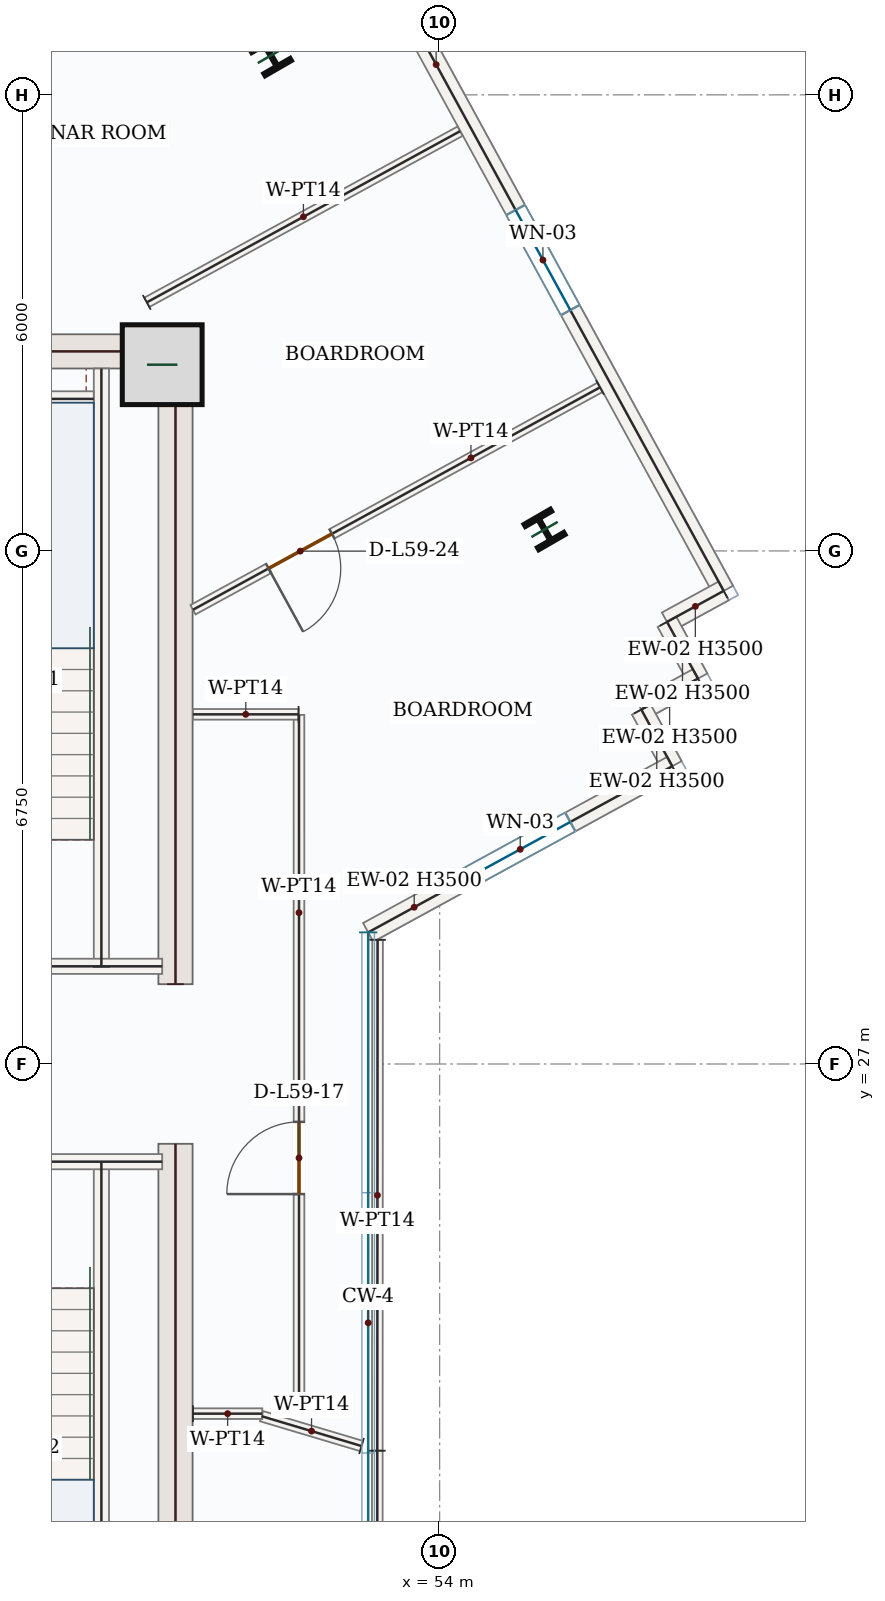
"""IFC4 building model, lengths in metres.
Left out: names, types, materials, properties, quantities, classifications, styles, units other than length and angle.
Written with IfcOpenShell. Run it as: python <this file> out.ifc"""

import sys

from ifc_helpers import new_model, si_unit, direction, frame, frame_2d, origin, origin_2d, place, context, subcontext, project, spatial, rectangle, i_section, extrude, source, transform, mapped, element, fill, save


model = new_model("IFC4")
c1 = context("Model", 3, precision=1e-05, world=origin(), true_north=direction((0.0, 1.0)))
c2 = subcontext(c1, "Body", "Model", "MODEL_VIEW")
j1 = project(units=[si_unit("LENGTHUNIT", "METRE"), si_unit("PLANEANGLEUNIT", "RADIAN")], contexts=[c1])
p1 = place(None, origin())
s1 = spatial("IfcSite", under=j1, at=p1, CompositionType="ELEMENT")
p2 = place(p1, origin())
s2 = spatial("IfcBuilding", under=s1, at=p2, CompositionType="ELEMENT")
p3 = place(p2, frame((0.0, 0.0, 250.35)))
s3 = spatial("IfcBuildingStorey", under=s2, at=p3, CompositionType="ELEMENT", Elevation=250.35)
m1 = source(origin(), c2, "Body", "SweptSolid", [
    extrude(rectangle(XDim=8.55, YDim=0.45, at=frame_2d((4.275, 0.0))), origin(), (0.0, 0.0, 1.0), 3.5),
])
for number, where, z_axis, x_axis in (
    (1, (50.525, 17.4, 0.0), (0.0, 0.0, 1.0), (0.0, 1.0, 0.0)),
    (2, (50.525, 28.05, 0.0), (0.0, 0.0, 1.0), (0.0, 1.0, 0.0)),
):
    element("IfcWall", number, at=place(p3, frame(where, z_axis=z_axis, x_axis=x_axis)), inside=s3, PredefinedType="SHEAR", context=c2, shape_type="MappedRepresentation", body=[
        mapped(m1, transform((0.0, 0.0, 0.0), x_axis=(1.0, 0.0, 0.0), y_axis=(0.0, 1.0, 0.0), z_axis=(0.0, 0.0, 1.0), scale=1.0)),
    ])
m2 = source(origin(), c2, "Body", "SweptSolid", [
    extrude(rectangle(XDim=7.1, YDim=0.45, at=frame_2d((3.55, 0.0))), origin(), (0.0, 0.0, 1.0), 3.5),
])
p4 = place(p3, frame((43.2, 36.375, 0.0), z_axis=(0.0, 0.0, 1.0), x_axis=(1.0, 0.0, 0.0)))
e3 = element("IfcWall", 3, at=p4, inside=s3, PredefinedType="SHEAR", context=c2, shape_type="MappedRepresentation", body=[
    mapped(m2, transform((0.0, 0.0, 0.0), x_axis=(1.0, 0.0, 0.0), y_axis=(0.0, 1.0, 0.0), z_axis=(0.0, 0.0, 1.0), scale=1.0)),
])
m3 = source(origin(), c2, "Body", "SweptSolid", [
    extrude(rectangle(XDim=1.05, YDim=1.05, at=origin_2d()), origin(), (0.0, 0.0, 1.0), 3.75),
])
p5 = place(p3, frame((50.35, 36.2, 0.0), z_axis=(0.0, 0.0, 1.0), x_axis=(1.0, 0.0, 0.0)))
e4 = element("IfcColumn", 4, at=p5, inside=s3, PredefinedType="COLUMN", context=c2, shape_type="MappedRepresentation", body=[
    mapped(m3, transform((0.0, 0.0, 0.0), x_axis=(1.0, 0.0, 0.0), y_axis=(0.0, 1.0, 0.0), z_axis=(0.0, 0.0, 1.0), scale=1.0)),
])
m4 = source(origin(), c2, "Body", "SweptSolid", [
    extrude(i_section(OverallWidth=0.399, OverallDepth=0.386, WebThickness=0.021, FlangeThickness=0.033, FilletRadius=0.018, at=origin_2d()), origin(), (0.0, 0.0, 1.0), 3.75),
])
for number, where, z_axis, x_axis in (
    (5, (55.38, 34.032, 0.0), (0.0, 0.0, 1.0), (0.866, 0.5, 0.0)),
    (6, (51.78, 40.268, 0.0), (0.0, 0.0, 1.0), (0.866, 0.5, 0.0)),
):
    element("IfcColumn", number, at=place(p3, frame(where, z_axis=z_axis, x_axis=x_axis)), inside=s3, PredefinedType="COLUMN", context=c2, shape_type="MappedRepresentation", body=[
        mapped(m4, transform((0.0, 0.0, 0.0), x_axis=(1.0, 0.0, 0.0), y_axis=(0.0, 1.0, 0.0), z_axis=(0.0, 0.0, 1.0), scale=1.0)),
    ])
p6 = place(p3, frame((44.549, 39.26, 0.0), z_axis=(0.0, 0.0, 1.0), x_axis=(0.877569176667, 0.479450039279, 0.0)))
e7 = element("IfcWall", 7, at=p6, inside=s3, PredefinedType="SOLIDWALL", context=c2, shape_type="SweptSolid", body=[
    extrude(rectangle(XDim=6.979, YDim=0.28, at=frame_2d((3.49, 0.0))), origin(), (0.0, 0.0, 1.0), 3.5),
])
p7 = place(p6, frame((2.74, 0.0, 0.85)))
e8 = element("IfcOpeningElement", 8, at=p7, cuts=e7, PredefinedType="OPENING", context=c2, shape_type="SweptSolid", body=[
    extrude(rectangle(XDim=1.5, YDim=1.5, at=frame_2d((0.75, 0.75))), frame((0.0, 0.15, 0.0), z_axis=(0.0, -1.0, 0.0), x_axis=(1.0, 0.0, 0.0)), (0.0, 0.0, 1.0), 0.3),
])
p8 = place(p3, frame((52.981, 41.929, 0.0), z_axis=(0.0, 0.0, 1.0), x_axis=(0.479472774144, -0.877556755347, 0.0)))
e9 = element("IfcWall", 9, at=p8, inside=s3, PredefinedType="SOLIDWALL", context=c2, shape_type="SweptSolid", body=[
    extrude(rectangle(XDim=9.92, YDim=0.28, at=frame_2d((4.96, 0.0))), origin(), (0.0, 0.0, 1.0), 3.5),
])
p9 = place(p8, frame((4.21, 0.0, 0.85)))
e10 = element("IfcOpeningElement", 10, at=p9, cuts=e9, PredefinedType="OPENING", context=c2, shape_type="SweptSolid", body=[
    extrude(rectangle(XDim=1.5, YDim=1.5, at=frame_2d((0.75, 0.75))), frame((0.0, 0.15, 0.0), z_axis=(0.0, -1.0, 0.0), x_axis=(1.0, 0.0, 0.0)), (0.0, 0.0, 1.0), 0.3),
])
m5 = source(origin(), c2, "Body", "SweptSolid", [
    extrude(rectangle(XDim=0.85, YDim=0.28, at=frame_2d((0.425, 0.0))), origin(), (0.0, 0.0, 1.0), 3.5),
])
p10 = place(p3, frame((57.737, 33.224, 0.0), z_axis=(0.0, 0.0, 1.0), x_axis=(-0.87752219781, -0.479536017782, 0.0)))
e11 = element("IfcWall", 11, at=p10, inside=s3, PredefinedType="SOLIDWALL", context=c2, shape_type="MappedRepresentation", body=[
    mapped(m5, transform((0.0, 0.0, 0.0), x_axis=(1.0, 0.0, 0.0), y_axis=(0.0, 1.0, 0.0), z_axis=(0.0, 0.0, 1.0), scale=1.0)),
])
m6 = source(origin(), c2, "Body", "SweptSolid", [
    extrude(rectangle(XDim=0.85, YDim=0.28, at=frame_2d((0.425, 0.0))), origin(), (0.0, 0.0, 1.0), 3.5),
])
for number, where, z_axis, x_axis in (
    (12, (56.991, 32.816, 0.0), (0.0, 0.0, 1.0), (0.479, -0.878, 0.0)),
    (13, (57.399, 32.071, 0.0), (0.0, 0.0, 1.0), (-0.878, -0.479, 0.0)),
):
    element("IfcWall", number, at=place(p3, frame(where, z_axis=z_axis, x_axis=x_axis)), inside=s3, PredefinedType="SOLIDWALL", context=c2, shape_type="MappedRepresentation", body=[
        mapped(m6, transform((0.0, 0.0, 0.0), x_axis=(1.0, 0.0, 0.0), y_axis=(0.0, 1.0, 0.0), z_axis=(0.0, 0.0, 1.0), scale=1.0)),
    ])
m7 = source(origin(), c2, "Body", "SweptSolid", [
    extrude(rectangle(XDim=0.85, YDim=0.28, at=frame_2d((0.425, 0.0))), origin(), (0.0, 0.0, 1.0), 3.5),
])
p11 = place(p3, frame((56.653, 31.663, 0.0), z_axis=(0.0, 0.0, 1.0), x_axis=(0.479314855696, -0.877643019177, 0.0)))
e14 = element("IfcWall", 14, at=p11, inside=s3, PredefinedType="SOLIDWALL", context=c2, shape_type="MappedRepresentation", body=[
    mapped(m7, transform((0.0, 0.0, 0.0), x_axis=(1.0, 0.0, 0.0), y_axis=(0.0, 1.0, 0.0), z_axis=(0.0, 0.0, 1.0), scale=1.0)),
])
p12 = place(p3, frame((57.06, 30.917, 0.0), z_axis=(0.0, 0.0, 1.0), x_axis=(-0.877563774399, -0.479459927276, 0.0)))
e15 = element("IfcWall", 15, at=p12, inside=s3, PredefinedType="SOLIDWALL", context=c2, shape_type="SweptSolid", body=[
    extrude(rectangle(XDim=4.558, YDim=0.28, at=frame_2d((2.279, 0.0))), origin(), (0.0, 0.0, 1.0), 3.5),
])
p13 = place(p12, frame((1.529, 0.0, 0.85)))
e16 = element("IfcOpeningElement", 16, at=p13, cuts=e15, PredefinedType="OPENING", context=c2, shape_type="SweptSolid", body=[
    extrude(rectangle(XDim=1.5, YDim=1.5, at=frame_2d((0.75, 0.75))), frame((0.0, 0.15, 0.0), z_axis=(0.0, -1.0, 0.0), x_axis=(1.0, 0.0, 0.0)), (0.0, 0.0, 1.0), 0.3),
])
m8 = source(origin(), c2, "Body", "SweptSolid", [
    extrude(rectangle(XDim=7.87, YDim=0.2, at=frame_2d((3.935, 0.0))), origin(), (0.0, 0.0, 1.0), 3.5),
])
for number, where, z_axis, x_axis in (
    (17, (49.55, 17.85, 0.0), (0.0, 0.0, 1.0), (0.0, 1.0, 0.0)),
    (18, (49.55, 28.28, 0.0), (0.0, 0.0, 1.0), (0.0, 1.0, 0.0)),
):
    element("IfcWall", number, at=place(p3, frame(where, z_axis=z_axis, x_axis=x_axis)), inside=s3, PredefinedType="SOLIDWALL", context=c2, shape_type="MappedRepresentation", body=[
        mapped(m8, transform((0.0, 0.0, 0.0), x_axis=(1.0, 0.0, 0.0), y_axis=(0.0, 1.0, 0.0), z_axis=(0.0, 0.0, 1.0), scale=1.0)),
    ])
m9 = source(origin(), c2, "Body", "SweptSolid", [
    extrude(rectangle(XDim=4.25, YDim=0.2, at=frame_2d((2.125, 0.0))), origin(), (0.0, 0.0, 1.0), 3.5),
])
for number, where, z_axis, x_axis in (
    (19, (46.1, 25.715, 0.0), (0.0, 0.0, 1.0), (1.0, 0.0, 0.0)),
    (20, (46.1, 28.285, 0.0), (0.0, 0.0, 1.0), (1.0, 0.0, 0.0)),
):
    element("IfcWall", number, at=place(p3, frame(where, z_axis=z_axis, x_axis=x_axis)), inside=s3, PredefinedType="SOLIDWALL", context=c2, shape_type="MappedRepresentation", body=[
        mapped(m9, transform((0.0, 0.0, 0.0), x_axis=(1.0, 0.0, 0.0), y_axis=(0.0, 1.0, 0.0), z_axis=(0.0, 0.0, 1.0), scale=1.0)),
    ])
m10 = source(origin(), c2, "Body", "SweptSolid", [
    extrude(rectangle(XDim=3.25, YDim=0.2, at=frame_2d((1.625, 0.0))), origin(), (0.0, 0.0, 1.0), 3.5),
])
p14 = place(p3, frame((46.2, 35.75, 0.0), z_axis=(0.0, 0.0, 1.0), x_axis=(1.0, 0.0, 0.0)))
e21 = element("IfcWall", 21, at=p14, inside=s3, PredefinedType="SOLIDWALL", context=c2, shape_type="MappedRepresentation", body=[
    mapped(m10, transform((0.0, 0.0, 0.0), x_axis=(1.0, 0.0, 0.0), y_axis=(0.0, 1.0, 0.0), z_axis=(0.0, 0.0, 1.0), scale=1.0)),
])
m11 = source(origin(), c2, "Body", "SweptSolid", [
    extrude(rectangle(XDim=4.695, YDim=0.14, at=frame_2d((2.348, 0.0))), origin(), (0.0, 0.0, 1.0), 3.5),
])
p15 = place(p3, frame((50.148, 37.02, 0.0), z_axis=(0.0, 0.0, 1.0), x_axis=(0.877559526902, 0.479467701461, 0.0)))
e22 = element("IfcWall", 22, at=p15, inside=s3, PredefinedType="PARTITIONING", context=c2, shape_type="MappedRepresentation", body=[
    mapped(m11, transform((0.0, 0.0, 0.0), x_axis=(1.0, 0.0, 0.0), y_axis=(0.0, 1.0, 0.0), z_axis=(0.0, 0.0, 1.0), scale=1.0)),
])
p16 = place(p3, frame((56.109, 35.901, 0.0), z_axis=(0.0, 0.0, 1.0), x_axis=(-0.877574248726, -0.479440755436, 0.0)))
e23 = element("IfcWall", 23, at=p16, inside=s3, PredefinedType="PARTITIONING", context=c2, shape_type="SweptSolid", body=[
    extrude(rectangle(XDim=6.102, YDim=0.14, at=frame_2d((3.051, 0.0))), origin(), (0.0, 0.0, 1.0), 3.5),
])
p17 = place(p16, frame((4.018, 0.0, 0.0)))
e24 = element("IfcOpeningElement", 24, at=p17, cuts=e23, PredefinedType="OPENING", context=c2, shape_type="SweptSolid", body=[
    extrude(rectangle(XDim=0.95, YDim=2.15, at=frame_2d((0.475, 1.075))), frame((0.0, 0.08, 0.0), z_axis=(0.0, -1.0, 0.0), x_axis=(1.0, 0.0, 0.0)), (0.0, 0.0, 1.0), 0.16),
])
p18 = place(p3, frame((52.15, 22.406, 0.0), z_axis=(0.0, 0.0, 1.0), x_axis=(-2.657666e-05, 0.999999999647, 0.0)))
e25 = element("IfcWall", 25, at=p18, inside=s3, PredefinedType="PARTITIONING", context=c2, shape_type="SweptSolid", body=[
    extrude(rectangle(XDim=9.186, YDim=0.14, at=frame_2d((4.593, 0.0))), origin(), (0.0, 0.0, 1.0), 3.5),
])
p19 = place(p18, frame((2.883, 0.0, 0.0)))
e26 = element("IfcOpeningElement", 26, at=p19, cuts=e25, PredefinedType="OPENING", context=c2, shape_type="SweptSolid", body=[
    extrude(rectangle(XDim=0.95, YDim=2.15, at=frame_2d((0.475, 1.075))), frame((0.0, 0.08, 0.0), z_axis=(0.0, -1.0, 0.0), x_axis=(1.0, 0.0, 0.0)), (0.0, 0.0, 1.0), 0.16),
])
m12 = source(origin(), c2, "Body", "SweptSolid", [
    extrude(rectangle(XDim=1.389, YDim=0.14, at=frame_2d((0.695, 0.0))), origin(), (0.0, 0.0, 1.0), 3.5),
])
p20 = place(p3, frame((52.144, 31.6, 0.0), z_axis=(0.0, 0.0, 1.0), x_axis=(-1.0, 0.0, 0.0)))
e27 = element("IfcWall", 27, at=p20, inside=s3, PredefinedType="PARTITIONING", context=c2, shape_type="MappedRepresentation", body=[
    mapped(m12, transform((0.0, 0.0, 0.0), x_axis=(1.0, 0.0, 0.0), y_axis=(0.0, 1.0, 0.0), z_axis=(0.0, 0.0, 1.0), scale=1.0)),
])
m13 = source(origin(), c2, "Body", "SweptSolid", [
    extrude(rectangle(XDim=6.722, YDim=0.14, at=frame_2d((3.361, 0.0))), origin(), (0.0, 0.0, 1.0), 3.5),
])
p21 = place(p3, frame((53.184, 28.634, 0.0), z_axis=(0.0, 0.0, 1.0), x_axis=(-0.000544820492, -0.999999851585, 0.0)))
e28 = element("IfcWall", 28, at=p21, inside=s3, PredefinedType="PARTITIONING", context=c2, shape_type="MappedRepresentation", body=[
    mapped(m13, transform((0.0, 0.0, 0.0), x_axis=(1.0, 0.0, 0.0), y_axis=(0.0, 1.0, 0.0), z_axis=(0.0, 0.0, 1.0), scale=1.0)),
])
m14 = source(origin(), c2, "Body", "SweptSolid", [
    extrude(rectangle(XDim=1.373, YDim=0.14, at=frame_2d((0.687, 0.0))), origin(), (0.0, 0.0, 1.0), 3.5),
])
p22 = place(p3, frame((52.972, 21.974, 0.0), z_axis=(0.0, 0.0, 1.0), x_axis=(-0.958236472503, 0.285977031883, 0.0)))
e29 = element("IfcWall", 29, at=p22, inside=s3, PredefinedType="PARTITIONING", context=c2, shape_type="MappedRepresentation", body=[
    mapped(m14, transform((0.0, 0.0, 0.0), x_axis=(1.0, 0.0, 0.0), y_axis=(0.0, 1.0, 0.0), z_axis=(0.0, 0.0, 1.0), scale=1.0)),
])
m15 = source(origin(), c2, "Body", "SweptSolid", [
    extrude(rectangle(XDim=0.912, YDim=0.14, at=frame_2d((0.456, 0.0))), origin(), (0.0, 0.0, 1.0), 3.5),
])
p23 = place(p3, frame((50.755, 22.4, 0.0), z_axis=(0.0, 0.0, 1.0), x_axis=(1.0, 0.0, 0.0)))
e30 = element("IfcWall", 30, at=p23, inside=s3, PredefinedType="PARTITIONING", context=c2, shape_type="MappedRepresentation", body=[
    mapped(m15, transform((0.0, 0.0, 0.0), x_axis=(1.0, 0.0, 0.0), y_axis=(0.0, 1.0, 0.0), z_axis=(0.0, 0.0, 1.0), scale=1.0)),
])
m16 = source(origin(), c2, "Body", "SweptSolid", [
    extrude(rectangle(XDim=3.504, YDim=0.14, at=frame_2d((1.752, 0.0))), origin(), (0.0, 0.0, 1.0), 3.5),
])
p24 = place(p3, frame((53.18, 21.912, 0.0), z_axis=(0.0, 0.0, 1.0), x_axis=(0.0, -1.0, 0.0)))
e31 = element("IfcWall", 31, at=p24, inside=s3, PredefinedType="PARTITIONING", context=c2, shape_type="MappedRepresentation", body=[
    mapped(m16, transform((0.0, 0.0, 0.0), x_axis=(1.0, 0.0, 0.0), y_axis=(0.0, 1.0, 0.0), z_axis=(0.0, 0.0, 1.0), scale=1.0)),
])
m17 = source(origin(), c2, "Body", "SweptSolid", [
    extrude(rectangle(XDim=1.5, YDim=1.5, at=frame_2d((0.75, 0.75))), frame((0.0, 0.03, 0.0), z_axis=(0.0, -1.0, 0.0), x_axis=(1.0, 0.0, 0.0)), (0.0, 0.0, 1.0), 0.06),
])
p25 = place(p9, origin())
e32 = element("IfcWindow", 32, at=p25, inside=s3, PartitioningType="SINGLE_PANEL", PredefinedType="WINDOW", context=c2, shape_type="MappedRepresentation", body=[
    mapped(m17, transform((0.0, 0.0, 0.0), x_axis=(1.0, 0.0, 0.0), y_axis=(0.0, 1.0, 0.0), z_axis=(0.0, 0.0, 1.0), scale=1.0)),
])
fill(e10, e32)
p26 = place(p13, origin())
e33 = element("IfcWindow", 33, at=p26, inside=s3, PartitioningType="SINGLE_PANEL", PredefinedType="WINDOW", context=c2, shape_type="MappedRepresentation", body=[
    mapped(m17, transform((0.0, 0.0, 0.0), x_axis=(1.0, 0.0, 0.0), y_axis=(0.0, 1.0, 0.0), z_axis=(0.0, 0.0, 1.0), scale=1.0)),
])
fill(e16, e33)
m18 = source(origin(), c2, "Body", "SweptSolid", [
    extrude(rectangle(XDim=0.95, YDim=2.15, at=frame_2d((0.475, 1.075))), frame((0.0, 0.025, 0.0), z_axis=(0.0, -1.0, 0.0), x_axis=(1.0, 0.0, 0.0)), (0.0, 0.0, 1.0), 0.05),
])
p27 = place(p19, origin())
e34 = element("IfcDoor", 34, at=p27, inside=s3, OperationType="SINGLE_SWING_LEFT", PredefinedType="DOOR", context=c2, shape_type="MappedRepresentation", body=[
    mapped(m18, transform((0.0, 0.0, 0.0), x_axis=(1.0, 0.0, 0.0), y_axis=(0.0, 1.0, 0.0), z_axis=(0.0, 0.0, 1.0), scale=1.0)),
])
fill(e26, e34)
p28 = place(p17, origin())
e35 = element("IfcDoor", 35, at=p28, inside=s3, OperationType="SINGLE_SWING_RIGHT", PredefinedType="DOOR", context=c2, shape_type="MappedRepresentation", body=[
    mapped(m18, transform((0.0, 0.0, 0.0), x_axis=(1.0, 0.0, 0.0), y_axis=(0.0, 1.0, 0.0), z_axis=(0.0, 0.0, 1.0), scale=1.0)),
])
fill(e24, e35)
save(model, sys.argv[1])
